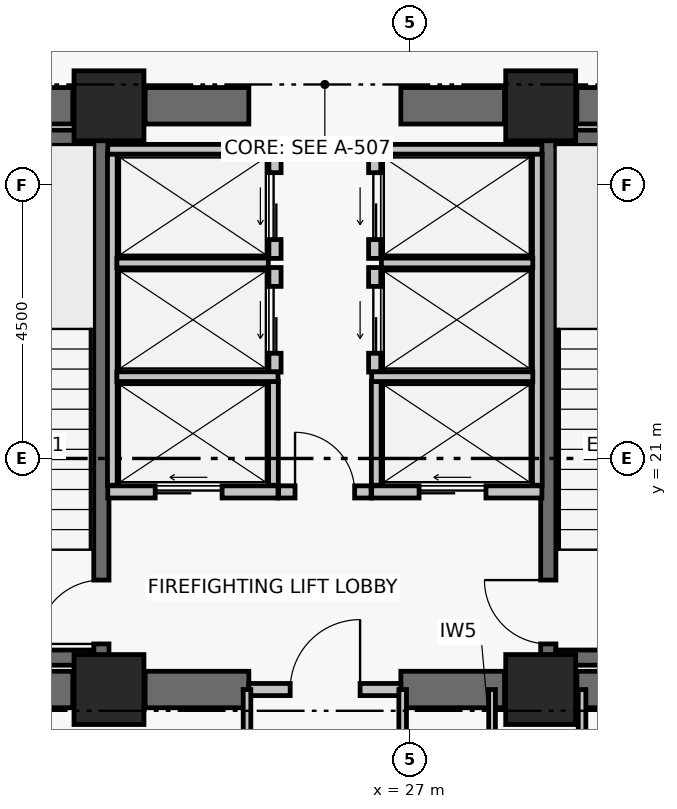
"""IFC4 building model, lengths in metres.
Left out: names, types, materials, properties, quantities, classifications, styles, units other than length and angle.
Written with IfcOpenShell. Run it as: python <this file> out.ifc"""

import sys

from ifc_helpers import new_model, si_unit, direction, frame, frame_2d, origin, origin_2d, place, context, subcontext, project, spatial, rectangle, extrude, element, fill, save


model = new_model("IFC4")
c1 = context("Model", 3, precision=1e-05, world=origin(), true_north=direction((0.0, 1.0)))
c2 = subcontext(c1, "Body", "Model", "MODEL_VIEW")
j1 = project(units=[si_unit("LENGTHUNIT", "METRE"), si_unit("PLANEANGLEUNIT", "RADIAN")], contexts=[c1])
p1 = place(None, origin())
s1 = spatial("IfcSite", under=j1, at=p1, CompositionType="ELEMENT")
p2 = place(p1, origin())
s2 = spatial("IfcBuilding", under=s1, at=p2, CompositionType="ELEMENT")
p3 = place(p2, frame((0.0, 0.0, 79.68)))
s3 = spatial("IfcBuildingStorey", under=s2, at=p3, CompositionType="ELEMENT", Elevation=79.68)
for number, where, z_axis, x_axis in (
    (1, (22.05, 17.2, 0.0), (0.0, 0.0, 1.0), (1.0, 0.0, 0.0)),
    (2, (29.15, 17.2, 0.0), (0.0, 0.0, 1.0), (1.0, 0.0, 0.0)),
    (3, (22.05, 26.8, 0.0), (0.0, 0.0, 1.0), (1.0, 0.0, 0.0)),
    (4, (29.15, 26.8, 0.0), (0.0, 0.0, 1.0), (1.0, 0.0, 0.0)),
):
    element("IfcColumn", number, at=place(p3, frame(where, z_axis=z_axis, x_axis=x_axis)), inside=s3, PredefinedType="COLUMN", context=c2, shape_type="SweptSolid", body=[
        extrude(rectangle(XDim=1.15, YDim=1.15, at=origin_2d()), origin(), (0.0, 0.0, 1.0), 3.72),
    ])
p4 = place(p3, frame((18.395, 17.2, 0.0), z_axis=(0.0, 0.0, 1.0), x_axis=(1.0, 0.0, 0.0)))
e5 = element("IfcWall", 5, at=p4, inside=s3, PredefinedType="SHEAR", context=c2, shape_type="SweptSolid", body=[
    extrude(rectangle(XDim=3.06, YDim=0.6, at=frame_2d((1.53, 0.0))), origin(), (0.0, 0.0, 1.0), 3.38),
])
p5 = place(p3, frame((22.645, 17.2, 0.0), z_axis=(0.0, 0.0, 1.0), x_axis=(1.0, 0.0, 0.0)))
e6 = element("IfcWall", 6, at=p5, inside=s3, PredefinedType="SHEAR", context=c2, shape_type="SweptSolid", body=[
    extrude(rectangle(XDim=1.705, YDim=0.6, at=frame_2d((0.853, 0.0))), origin(), (0.0, 0.0, 1.0), 3.38),
])
p6 = place(p3, frame((26.85, 17.2, 0.0), z_axis=(0.0, 0.0, 1.0), x_axis=(1.0, 0.0, 0.0)))
e7 = element("IfcWall", 7, at=p6, inside=s3, PredefinedType="SHEAR", context=c2, shape_type="SweptSolid", body=[
    extrude(rectangle(XDim=1.705, YDim=0.6, at=frame_2d((0.853, 0.0))), origin(), (0.0, 0.0, 1.0), 3.38),
])
p7 = place(p3, frame((29.745, 17.2, 0.0), z_axis=(0.0, 0.0, 1.0), x_axis=(1.0, 0.0, 0.0)))
e8 = element("IfcWall", 8, at=p7, inside=s3, PredefinedType="SHEAR", context=c2, shape_type="SweptSolid", body=[
    extrude(rectangle(XDim=3.06, YDim=0.6, at=frame_2d((1.53, 0.0))), origin(), (0.0, 0.0, 1.0), 3.38),
])
p8 = place(p3, frame((18.395, 26.8, 0.0), z_axis=(0.0, 0.0, 1.0), x_axis=(1.0, 0.0, 0.0)))
e9 = element("IfcWall", 9, at=p8, inside=s3, PredefinedType="SHEAR", context=c2, shape_type="SweptSolid", body=[
    extrude(rectangle(XDim=3.06, YDim=0.6, at=frame_2d((1.53, 0.0))), origin(), (0.0, 0.0, 1.0), 3.38),
])
p9 = place(p3, frame((22.645, 26.8, 0.0), z_axis=(0.0, 0.0, 1.0), x_axis=(1.0, 0.0, 0.0)))
e10 = element("IfcWall", 10, at=p9, inside=s3, PredefinedType="SHEAR", context=c2, shape_type="SweptSolid", body=[
    extrude(rectangle(XDim=1.705, YDim=0.6, at=frame_2d((0.853, 0.0))), origin(), (0.0, 0.0, 1.0), 3.38),
])
p10 = place(p3, frame((26.85, 26.8, 0.0), z_axis=(0.0, 0.0, 1.0), x_axis=(1.0, 0.0, 0.0)))
e11 = element("IfcWall", 11, at=p10, inside=s3, PredefinedType="SHEAR", context=c2, shape_type="SweptSolid", body=[
    extrude(rectangle(XDim=1.705, YDim=0.6, at=frame_2d((0.853, 0.0))), origin(), (0.0, 0.0, 1.0), 3.38),
])
p11 = place(p3, frame((29.745, 26.8, 0.0), z_axis=(0.0, 0.0, 1.0), x_axis=(1.0, 0.0, 0.0)))
e12 = element("IfcWall", 12, at=p11, inside=s3, PredefinedType="SHEAR", context=c2, shape_type="SweptSolid", body=[
    extrude(rectangle(XDim=3.06, YDim=0.6, at=frame_2d((1.53, 0.0))), origin(), (0.0, 0.0, 1.0), 3.38),
])
p12 = place(p3, frame((21.925, 17.6, 0.0), z_axis=(0.0, 0.0, 1.0), x_axis=(0.0, 1.0, 0.0)))
e13 = element("IfcWall", 13, at=p12, inside=s3, PredefinedType="SHEAR", context=c2, shape_type="SweptSolid", body=[
    extrude(rectangle(XDim=8.8, YDim=0.25, at=frame_2d((4.4, 0.0))), origin(), (0.0, 0.0, 1.0), 3.38),
])
p13 = place(p12, frame((0.35, 0.0, 0.0)))
e14 = element("IfcOpeningElement", 14, at=p13, cuts=e13, PredefinedType="OPENING", context=c2, shape_type="SweptSolid", body=[
    extrude(rectangle(XDim=1.05, YDim=2.08, at=frame_2d((0.525, 1.04))), frame((0.0, 0.135, 0.0), z_axis=(0.0, -1.0, 0.0), x_axis=(1.0, 0.0, 0.0)), (0.0, 0.0, 1.0), 0.27),
])
for number, where, z_axis, x_axis in (
    (15, (18.354, 17.725, 0.0), (0.0, 0.0, 1.0), (1.0, 0.0, 0.0)),
    (16, (18.354, 26.275, 0.0), (0.0, 0.0, 1.0), (1.0, 0.0, 0.0)),
):
    element("IfcWall", number, at=place(p3, frame(where, z_axis=z_axis, x_axis=x_axis)), inside=s3, PredefinedType="SHEAR", context=c2, shape_type="SweptSolid", body=[
        extrude(rectangle(XDim=3.446, YDim=0.25, at=frame_2d((1.723, 0.0))), origin(), (0.0, 0.0, 1.0), 3.38),
    ])
p14 = place(p3, frame((29.275, 17.6, 0.0), z_axis=(0.0, 0.0, 1.0), x_axis=(0.0, 1.0, 0.0)))
e17 = element("IfcWall", 17, at=p14, inside=s3, PredefinedType="SHEAR", context=c2, shape_type="SweptSolid", body=[
    extrude(rectangle(XDim=8.8, YDim=0.25, at=frame_2d((4.4, 0.0))), origin(), (0.0, 0.0, 1.0), 3.38),
])
p15 = place(p14, frame((0.35, 0.0, 0.0)))
e18 = element("IfcOpeningElement", 18, at=p15, cuts=e17, PredefinedType="OPENING", context=c2, shape_type="SweptSolid", body=[
    extrude(rectangle(XDim=1.05, YDim=2.08, at=frame_2d((0.525, 1.04))), frame((0.0, 0.135, 0.0), z_axis=(0.0, -1.0, 0.0), x_axis=(1.0, 0.0, 0.0)), (0.0, 0.0, 1.0), 0.27),
])
for number, where, z_axis, x_axis in (
    (19, (29.4, 17.725, 0.0), (0.0, 0.0, 1.0), (1.0, 0.0, 0.0)),
    (20, (29.4, 26.275, 0.0), (0.0, 0.0, 1.0), (1.0, 0.0, 0.0)),
):
    element("IfcWall", number, at=place(p3, frame(where, z_axis=z_axis, x_axis=x_axis)), inside=s3, PredefinedType="SHEAR", context=c2, shape_type="SweptSolid", body=[
        extrude(rectangle(XDim=3.446, YDim=0.25, at=frame_2d((1.723, 0.0))), origin(), (0.0, 0.0, 1.0), 3.38),
    ])
p16 = place(p3, frame((24.35, 17.2, 0.0), z_axis=(0.0, 0.0, 1.0), x_axis=(1.0, 0.0, 0.0)))
e21 = element("IfcWall", 21, at=p16, inside=s3, PredefinedType="PARTITIONING", context=c2, shape_type="SweptSolid", body=[
    extrude(rectangle(XDim=2.5, YDim=0.2, at=frame_2d((1.25, 0.0))), origin(), (0.0, 0.0, 1.0), 2.51),
])
p17 = place(p16, frame((0.68, 0.0, 0.0)))
e22 = element("IfcOpeningElement", 22, at=p17, cuts=e21, PredefinedType="OPENING", context=c2, shape_type="SweptSolid", body=[
    extrude(rectangle(XDim=1.15, YDim=2.08, at=frame_2d((0.575, 1.04))), frame((0.0, 0.11, 0.0), z_axis=(0.0, -1.0, 0.0), x_axis=(1.0, 0.0, 0.0)), (0.0, 0.0, 1.0), 0.22),
])
p18 = place(p3, frame((24.84, 20.45, 0.0), z_axis=(0.0, 0.0, 1.0), x_axis=(1.0, 0.0, 0.0)))
e23 = element("IfcWall", 23, at=p18, inside=s3, PredefinedType="PARTITIONING", context=c2, shape_type="SweptSolid", body=[
    extrude(rectangle(XDim=1.52, YDim=0.2, at=frame_2d((0.76, 0.0))), origin(), (0.0, 0.0, 1.0), 3.38),
])
p19 = place(p18, frame((0.27, 0.0, 0.0)))
e24 = element("IfcOpeningElement", 24, at=p19, cuts=e23, PredefinedType="OPENING", context=c2, shape_type="SweptSolid", body=[
    extrude(rectangle(XDim=0.98, YDim=2.06, at=frame_2d((0.49, 1.03))), frame((0.0, 0.11, 0.0), z_axis=(0.0, -1.0, 0.0), x_axis=(1.0, 0.0, 0.0)), (0.0, 0.0, 1.0), 0.22),
])
p20 = place(p3, frame((22.03, 20.45, 0.0), z_axis=(0.0, 0.0, 1.0), x_axis=(1.0, 0.0, 0.0)))
e25 = element("IfcWall", 25, at=p20, inside=s3, PredefinedType="PARTITIONING", context=c2, shape_type="SweptSolid", body=[
    extrude(rectangle(XDim=2.8, YDim=0.2, at=frame_2d((1.4, 0.0))), origin(), (0.0, 0.0, 1.0), 3.38),
])
p21 = place(p20, frame((0.78, 0.0, 0.0)))
e26 = element("IfcOpeningElement", 26, at=p21, cuts=e25, PredefinedType="OPENING", context=c2, shape_type="SweptSolid", body=[
    extrude(rectangle(XDim=1.1, YDim=2.08, at=frame_2d((0.55, 1.04))), frame((0.0, 0.11, 0.0), z_axis=(0.0, -1.0, 0.0), x_axis=(1.0, 0.0, 0.0)), (0.0, 0.0, 1.0), 0.22),
])
p22 = place(p3, frame((26.37, 20.45, 0.0), z_axis=(0.0, 0.0, 1.0), x_axis=(1.0, 0.0, 0.0)))
e27 = element("IfcWall", 27, at=p22, inside=s3, PredefinedType="PARTITIONING", context=c2, shape_type="SweptSolid", body=[
    extrude(rectangle(XDim=2.8, YDim=0.2, at=frame_2d((1.4, 0.0))), origin(), (0.0, 0.0, 1.0), 3.38),
])
p23 = place(p22, frame((0.78, 0.0, 0.0)))
e28 = element("IfcOpeningElement", 28, at=p23, cuts=e27, PredefinedType="OPENING", context=c2, shape_type="SweptSolid", body=[
    extrude(rectangle(XDim=1.1, YDim=2.08, at=frame_2d((0.55, 1.04))), frame((0.0, 0.11, 0.0), z_axis=(0.0, -1.0, 0.0), x_axis=(1.0, 0.0, 0.0)), (0.0, 0.0, 1.0), 0.22),
])
p24 = place(p3, frame((24.78, 22.42, 0.0), z_axis=(0.0, 0.0, 1.0), x_axis=(0.0, 1.0, 0.0)))
e29 = element("IfcWall", 29, at=p24, inside=s3, PredefinedType="PARTITIONING", context=c2, shape_type="SweptSolid", body=[
    extrude(rectangle(XDim=1.72, YDim=0.2, at=frame_2d((0.86, 0.0))), origin(), (0.0, 0.0, 1.0), 3.38),
])
p25 = place(p24, frame((0.31, 0.0, 0.0)))
e30 = element("IfcOpeningElement", 30, at=p25, cuts=e29, PredefinedType="OPENING", context=c2, shape_type="SweptSolid", body=[
    extrude(rectangle(XDim=1.1, YDim=2.08, at=frame_2d((0.55, 1.04))), frame((0.0, 0.11, 0.0), z_axis=(0.0, -1.0, 0.0), x_axis=(1.0, 0.0, 0.0)), (0.0, 0.0, 1.0), 0.22),
])
p26 = place(p3, frame((24.78, 24.29, 0.0), z_axis=(0.0, 0.0, 1.0), x_axis=(0.0, 1.0, 0.0)))
e31 = element("IfcWall", 31, at=p26, inside=s3, PredefinedType="PARTITIONING", context=c2, shape_type="SweptSolid", body=[
    extrude(rectangle(XDim=1.72, YDim=0.2, at=frame_2d((0.86, 0.0))), origin(), (0.0, 0.0, 1.0), 3.38),
])
p27 = place(p26, frame((0.31, 0.0, 0.0)))
e32 = element("IfcOpeningElement", 32, at=p27, cuts=e31, PredefinedType="OPENING", context=c2, shape_type="SweptSolid", body=[
    extrude(rectangle(XDim=1.1, YDim=2.08, at=frame_2d((0.55, 1.04))), frame((0.0, 0.11, 0.0), z_axis=(0.0, -1.0, 0.0), x_axis=(1.0, 0.0, 0.0)), (0.0, 0.0, 1.0), 0.22),
])
p28 = place(p3, frame((26.42, 22.42, 0.0), z_axis=(0.0, 0.0, 1.0), x_axis=(0.0, 1.0, 0.0)))
e33 = element("IfcWall", 33, at=p28, inside=s3, PredefinedType="PARTITIONING", context=c2, shape_type="SweptSolid", body=[
    extrude(rectangle(XDim=1.72, YDim=0.2, at=frame_2d((0.86, 0.0))), origin(), (0.0, 0.0, 1.0), 3.38),
])
p29 = place(p28, frame((0.31, 0.0, 0.0)))
e34 = element("IfcOpeningElement", 34, at=p29, cuts=e33, PredefinedType="OPENING", context=c2, shape_type="SweptSolid", body=[
    extrude(rectangle(XDim=1.1, YDim=2.08, at=frame_2d((0.55, 1.04))), frame((0.0, 0.11, 0.0), z_axis=(0.0, -1.0, 0.0), x_axis=(1.0, 0.0, 0.0)), (0.0, 0.0, 1.0), 0.22),
])
p30 = place(p3, frame((26.42, 24.29, 0.0), z_axis=(0.0, 0.0, 1.0), x_axis=(0.0, 1.0, 0.0)))
e35 = element("IfcWall", 35, at=p30, inside=s3, PredefinedType="PARTITIONING", context=c2, shape_type="SweptSolid", body=[
    extrude(rectangle(XDim=1.72, YDim=0.2, at=frame_2d((0.86, 0.0))), origin(), (0.0, 0.0, 1.0), 3.38),
])
p31 = place(p30, frame((0.31, 0.0, 0.0)))
e36 = element("IfcOpeningElement", 36, at=p31, cuts=e35, PredefinedType="OPENING", context=c2, shape_type="SweptSolid", body=[
    extrude(rectangle(XDim=1.1, YDim=2.08, at=frame_2d((0.55, 1.04))), frame((0.0, 0.11, 0.0), z_axis=(0.0, -1.0, 0.0), x_axis=(1.0, 0.0, 0.0)), (0.0, 0.0, 1.0), 0.22),
])
p32 = place(p3, frame((22.105, 20.56, 0.0), z_axis=(0.0, 0.0, 1.0), x_axis=(0.0, 1.0, 0.0)))
e37 = element("IfcWall", 37, at=p32, inside=s3, PredefinedType="PARTITIONING", context=c2, shape_type="SweptSolid", body=[
    extrude(rectangle(XDim=5.45, YDim=0.16, at=frame_2d((2.725, 0.0))), origin(), (0.0, 0.0, 1.0), 3.38),
])
p33 = place(p3, frame((24.755, 20.56, 0.0), z_axis=(0.0, 0.0, 1.0), x_axis=(0.0, 1.0, 0.0)))
e38 = element("IfcWall", 38, at=p33, inside=s3, PredefinedType="PARTITIONING", context=c2, shape_type="SweptSolid", body=[
    extrude(rectangle(XDim=1.71, YDim=0.16, at=frame_2d((0.855, 0.0))), origin(), (0.0, 0.0, 1.0), 3.38),
])
p34 = place(p3, frame((22.18, 22.345, 0.0), z_axis=(0.0, 0.0, 1.0), x_axis=(1.0, 0.0, 0.0)))
e39 = element("IfcWall", 39, at=p34, inside=s3, PredefinedType="PARTITIONING", context=c2, shape_type="SweptSolid", body=[
    extrude(rectangle(XDim=2.65, YDim=0.16, at=frame_2d((1.325, 0.0))), origin(), (0.0, 0.0, 1.0), 3.38),
])
p35 = place(p3, frame((22.18, 24.215, 0.0), z_axis=(0.0, 0.0, 1.0), x_axis=(1.0, 0.0, 0.0)))
e40 = element("IfcWall", 40, at=p35, inside=s3, PredefinedType="PARTITIONING", context=c2, shape_type="SweptSolid", body=[
    extrude(rectangle(XDim=2.49, YDim=0.16, at=frame_2d((1.245, 0.0))), origin(), (0.0, 0.0, 1.0), 3.38),
])
p36 = place(p3, frame((22.03, 26.085, 0.0), z_axis=(0.0, 0.0, 1.0), x_axis=(1.0, 0.0, 0.0)))
e41 = element("IfcWall", 41, at=p36, inside=s3, PredefinedType="PARTITIONING", context=c2, shape_type="SweptSolid", body=[
    extrude(rectangle(XDim=2.83, YDim=0.16, at=frame_2d((1.415, 0.0))), origin(), (0.0, 0.0, 1.0), 3.38),
])
p37 = place(p3, frame((29.095, 20.56, 0.0), z_axis=(0.0, 0.0, 1.0), x_axis=(0.0, 1.0, 0.0)))
e42 = element("IfcWall", 42, at=p37, inside=s3, PredefinedType="PARTITIONING", context=c2, shape_type="SweptSolid", body=[
    extrude(rectangle(XDim=5.45, YDim=0.16, at=frame_2d((2.725, 0.0))), origin(), (0.0, 0.0, 1.0), 3.38),
])
p38 = place(p3, frame((26.445, 20.56, 0.0), z_axis=(0.0, 0.0, 1.0), x_axis=(0.0, 1.0, 0.0)))
e43 = element("IfcWall", 43, at=p38, inside=s3, PredefinedType="PARTITIONING", context=c2, shape_type="SweptSolid", body=[
    extrude(rectangle(XDim=1.71, YDim=0.16, at=frame_2d((0.855, 0.0))), origin(), (0.0, 0.0, 1.0), 3.38),
])
p39 = place(p3, frame((26.37, 22.345, 0.0), z_axis=(0.0, 0.0, 1.0), x_axis=(1.0, 0.0, 0.0)))
e44 = element("IfcWall", 44, at=p39, inside=s3, PredefinedType="PARTITIONING", context=c2, shape_type="SweptSolid", body=[
    extrude(rectangle(XDim=2.65, YDim=0.16, at=frame_2d((1.325, 0.0))), origin(), (0.0, 0.0, 1.0), 3.38),
])
p40 = place(p3, frame((26.53, 24.215, 0.0), z_axis=(0.0, 0.0, 1.0), x_axis=(1.0, 0.0, 0.0)))
e45 = element("IfcWall", 45, at=p40, inside=s3, PredefinedType="PARTITIONING", context=c2, shape_type="SweptSolid", body=[
    extrude(rectangle(XDim=2.49, YDim=0.16, at=frame_2d((1.245, 0.0))), origin(), (0.0, 0.0, 1.0), 3.38),
])
p41 = place(p3, frame((26.34, 26.085, 0.0), z_axis=(0.0, 0.0, 1.0), x_axis=(1.0, 0.0, 0.0)))
e46 = element("IfcWall", 46, at=p41, inside=s3, PredefinedType="PARTITIONING", context=c2, shape_type="SweptSolid", body=[
    extrude(rectangle(XDim=2.83, YDim=0.16, at=frame_2d((1.415, 0.0))), origin(), (0.0, 0.0, 1.0), 3.38),
])
for number, where, z_axis, x_axis in (
    (47, (24.32, 14.95, 0.0), (0.0, 0.0, 1.0), (0.0, 1.0, 0.0)),
    (48, (26.88, 14.95, 0.0), (0.0, 0.0, 1.0), (0.0, 1.0, 0.0)),
):
    element("IfcWall", number, at=place(p3, frame(where, z_axis=z_axis, x_axis=x_axis)), inside=s3, PredefinedType="PARTITIONING", context=c2, shape_type="SweptSolid", body=[
        extrude(rectangle(XDim=2.25, YDim=0.125, at=frame_2d((1.125, 0.0))), origin(), (0.0, 0.0, 1.0), 2.51),
    ])
p42 = place(p3, frame((28.35, 14.95, 0.0), z_axis=(0.0, 0.0, 1.0), x_axis=(0.0, 1.0, 0.0)))
e49 = element("IfcWall", 49, at=p42, inside=s3, PredefinedType="PARTITIONING", context=c2, shape_type="SweptSolid", body=[
    extrude(rectangle(XDim=2.25, YDim=0.11, at=frame_2d((1.125, 0.0))), origin(), (0.0, 0.0, 1.0), 2.51),
])
p43 = place(p3, frame((29.83, 14.95, 0.0), z_axis=(0.0, 0.0, 1.0), x_axis=(0.0, 1.0, 0.0)))
e50 = element("IfcWall", 50, at=p43, inside=s3, PredefinedType="PARTITIONING", context=c2, shape_type="SweptSolid", body=[
    extrude(rectangle(XDim=2.25, YDim=0.125, at=frame_2d((1.125, 0.0))), origin(), (0.0, 0.0, 1.0), 2.51),
])
p44 = place(p13, origin())
e51 = element("IfcDoor", 51, at=p44, inside=s3, OperationType="SINGLE_SWING_LEFT", PredefinedType="DOOR", context=c2, shape_type="SweptSolid", body=[
    extrude(rectangle(XDim=1.05, YDim=2.08, at=frame_2d((0.525, 1.04))), frame((0.0, 0.025, 0.0), z_axis=(0.0, -1.0, 0.0), x_axis=(1.0, 0.0, 0.0)), (0.0, 0.0, 1.0), 0.05),
])
fill(e14, e51)
p45 = place(p15, origin())
e52 = element("IfcDoor", 52, at=p45, inside=s3, OperationType="SINGLE_SWING_RIGHT", PredefinedType="DOOR", context=c2, shape_type="SweptSolid", body=[
    extrude(rectangle(XDim=1.05, YDim=2.08, at=frame_2d((0.525, 1.04))), frame((0.0, 0.025, 0.0), z_axis=(0.0, -1.0, 0.0), x_axis=(1.0, 0.0, 0.0)), (0.0, 0.0, 1.0), 0.05),
])
fill(e18, e52)
p46 = place(p17, origin())
e53 = element("IfcDoor", 53, at=p46, inside=s3, OperationType="SINGLE_SWING_RIGHT", PredefinedType="DOOR", context=c2, shape_type="SweptSolid", body=[
    extrude(rectangle(XDim=1.15, YDim=2.08, at=frame_2d((0.575, 1.04))), frame((0.0, 0.025, 0.0), z_axis=(0.0, -1.0, 0.0), x_axis=(1.0, 0.0, 0.0)), (0.0, 0.0, 1.0), 0.05),
])
fill(e22, e53)
p47 = place(p19, origin())
e54 = element("IfcDoor", 54, at=p47, inside=s3, OperationType="SINGLE_SWING_LEFT", PredefinedType="DOOR", context=c2, shape_type="SweptSolid", body=[
    extrude(rectangle(XDim=0.98, YDim=2.06, at=frame_2d((0.49, 1.03))), frame((0.0, 0.025, 0.0), z_axis=(0.0, -1.0, 0.0), x_axis=(1.0, 0.0, 0.0)), (0.0, 0.0, 1.0), 0.05),
])
fill(e24, e54)
p48 = place(p21, origin())
e55 = element("IfcDoor", 55, at=p48, inside=s3, OperationType="DOUBLE_DOOR_SLIDING", PredefinedType="DOOR", context=c2, shape_type="SweptSolid", body=[
    extrude(rectangle(XDim=1.1, YDim=2.08, at=frame_2d((0.55, 1.04))), frame((0.0, 0.025, 0.0), z_axis=(0.0, -1.0, 0.0), x_axis=(1.0, 0.0, 0.0)), (0.0, 0.0, 1.0), 0.05),
])
fill(e26, e55)
p49 = place(p23, origin())
e56 = element("IfcDoor", 56, at=p49, inside=s3, OperationType="DOUBLE_DOOR_SLIDING", PredefinedType="DOOR", context=c2, shape_type="SweptSolid", body=[
    extrude(rectangle(XDim=1.1, YDim=2.08, at=frame_2d((0.55, 1.04))), frame((0.0, 0.025, 0.0), z_axis=(0.0, -1.0, 0.0), x_axis=(1.0, 0.0, 0.0)), (0.0, 0.0, 1.0), 0.05),
])
fill(e28, e56)
p50 = place(p25, origin())
e57 = element("IfcDoor", 57, at=p50, inside=s3, OperationType="DOUBLE_DOOR_SLIDING", PredefinedType="DOOR", context=c2, shape_type="SweptSolid", body=[
    extrude(rectangle(XDim=1.1, YDim=2.08, at=frame_2d((0.55, 1.04))), frame((0.0, 0.025, 0.0), z_axis=(0.0, -1.0, 0.0), x_axis=(1.0, 0.0, 0.0)), (0.0, 0.0, 1.0), 0.05),
])
fill(e30, e57)
p51 = place(p27, origin())
e58 = element("IfcDoor", 58, at=p51, inside=s3, OperationType="DOUBLE_DOOR_SLIDING", PredefinedType="DOOR", context=c2, shape_type="SweptSolid", body=[
    extrude(rectangle(XDim=1.1, YDim=2.08, at=frame_2d((0.55, 1.04))), frame((0.0, 0.025, 0.0), z_axis=(0.0, -1.0, 0.0), x_axis=(1.0, 0.0, 0.0)), (0.0, 0.0, 1.0), 0.05),
])
fill(e32, e58)
p52 = place(p29, origin())
e59 = element("IfcDoor", 59, at=p52, inside=s3, OperationType="DOUBLE_DOOR_SLIDING", PredefinedType="DOOR", context=c2, shape_type="SweptSolid", body=[
    extrude(rectangle(XDim=1.1, YDim=2.08, at=frame_2d((0.55, 1.04))), frame((0.0, 0.025, 0.0), z_axis=(0.0, -1.0, 0.0), x_axis=(1.0, 0.0, 0.0)), (0.0, 0.0, 1.0), 0.05),
])
fill(e34, e59)
p53 = place(p31, origin())
e60 = element("IfcDoor", 60, at=p53, inside=s3, OperationType="DOUBLE_DOOR_SLIDING", PredefinedType="DOOR", context=c2, shape_type="SweptSolid", body=[
    extrude(rectangle(XDim=1.1, YDim=2.08, at=frame_2d((0.55, 1.04))), frame((0.0, 0.025, 0.0), z_axis=(0.0, -1.0, 0.0), x_axis=(1.0, 0.0, 0.0)), (0.0, 0.0, 1.0), 0.05),
])
fill(e36, e60)
save(model, sys.argv[1])
